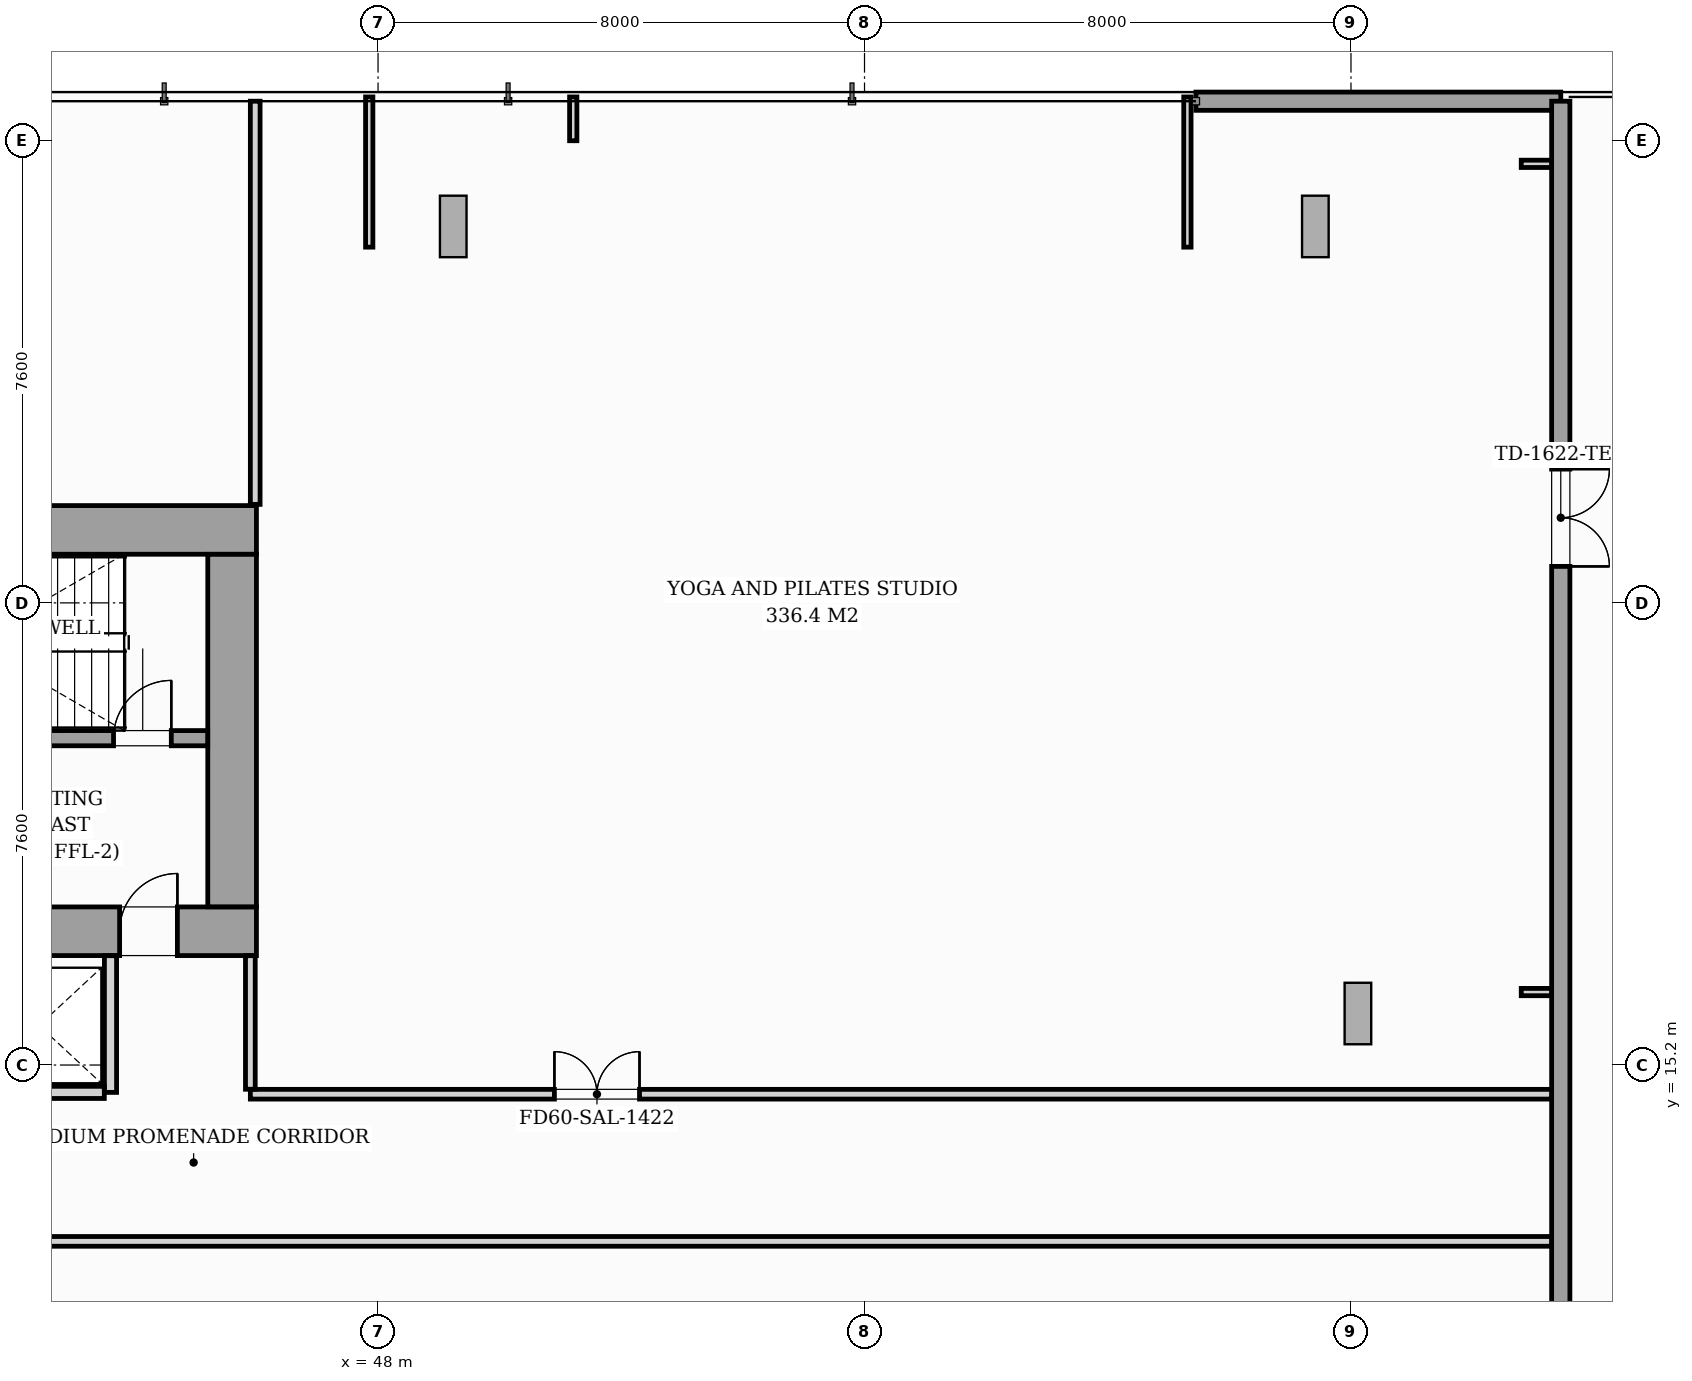
"""IFC4 building model, lengths in metres.
Left out: names, types, materials, properties, quantities, classifications, styles, units other than length and angle.
Written with IfcOpenShell. Run it as: python <this file> out.ifc"""

import sys

from ifc_helpers import new_model, si_unit, direction, frame, frame_2d, origin, origin_2d, place, context, subcontext, project, spatial, rectangle, i_section, extrude, source, transform, mapped, element, fill, save


model = new_model("IFC4")
c1 = context("Model", 3, precision=1e-05, world=origin(), true_north=direction((0.0, 1.0)))
c2 = subcontext(c1, "Body", "Model", "MODEL_VIEW")
j1 = project(units=[si_unit("LENGTHUNIT", "METRE"), si_unit("PLANEANGLEUNIT", "RADIAN")], contexts=[c1])
p1 = place(None, origin())
s1 = spatial("IfcSite", under=j1, at=p1, CompositionType="ELEMENT")
p2 = place(p1, origin())
s2 = spatial("IfcBuilding", under=s1, at=p2, CompositionType="ELEMENT")
p3 = place(p2, frame((0.0, 0.0, 18.5)))
s3 = spatial("IfcBuildingStorey", under=s2, at=p3, CompositionType="ELEMENT", Elevation=18.5)
m1 = source(origin(), c2, "Body", "SweptSolid", [
    extrude(i_section(OverallWidth=0.437, OverallDepth=0.514, WebThickness=0.061, FlangeThickness=0.097, FilletRadius=0.018, at=origin_2d()), origin(), (0.0, 0.0, 1.0), 4.496),
])
for number, where, z_axis, x_axis in (
    (1, (45.6, 17.4, 0.002), (0.0, 0.0, 1.0), (1.0, 0.0, 0.0)),
    (2, (45.6, 24.0, 0.002), (0.0, 0.0, 1.0), (1.0, 0.0, 0.0)),
):
    element("IfcColumn", number, at=place(p3, frame(where, z_axis=z_axis, x_axis=x_axis)), inside=s3, PredefinedType="PILASTER", context=c2, shape_type="MappedRepresentation", body=[
        mapped(m1, transform((0.0, 0.0, 0.0), scale=1.0)),
    ])
m2 = source(origin(), c2, "Body", "SweptSolid", [
    extrude(i_section(OverallWidth=0.438, OverallDepth=1.011, WebThickness=0.041, FlangeThickness=0.074, FilletRadius=0.024, at=origin_2d()), origin(), (0.0, 0.0, 1.0), 7.736),
])
p4 = place(p3, frame((50.874, 29.844, 0.205), z_axis=(-0.780442308848, -0.407074769473, 0.474552351821), x_axis=(0.420755799461, 0.219464101482, 0.880227280525)))
e3 = element("IfcColumn", 3, at=p4, inside=s3, PredefinedType="COLUMN", context=c2, shape_type="MappedRepresentation", body=[
    mapped(m2, transform((0.0, 0.0, 0.0), scale=1.0)),
])
m3 = source(origin(), c2, "Body", "SweptSolid", [
    extrude(i_section(OverallWidth=0.438, OverallDepth=1.011, WebThickness=0.041, FlangeThickness=0.074, FilletRadius=0.024, at=origin_2d()), origin(), (0.0, 0.0, 1.0), 10.322),
])
p5 = place(p3, frame((65.877, 29.834, 0.217), z_axis=(-0.885043945372, -0.303096269503, 0.353312703103), x_axis=(0.334254947044, 0.114470505156, 0.935505282628)))
e4 = element("IfcColumn", 4, at=p5, inside=s3, PredefinedType="COLUMN", context=c2, shape_type="MappedRepresentation", body=[
    mapped(m3, transform((0.0, 0.0, 0.0), scale=1.0)),
])
m4 = source(origin(), c2, "Body", "SweptSolid", [
    extrude(i_section(OverallWidth=0.438, OverallDepth=1.011, WebThickness=0.041, FlangeThickness=0.074, FilletRadius=0.024, at=origin_2d()), origin(), (0.0, 0.0, 1.0), 8.016),
])
p6 = place(p3, frame((66.023, 16.339, 0.207), z_axis=(-0.879002312118, -0.134551736364, 0.457439357218), x_axis=(0.452172509384, 0.069215513355, 0.889240819164)))
e5 = element("IfcColumn", 5, at=p6, inside=s3, PredefinedType="COLUMN", context=c2, shape_type="MappedRepresentation", body=[
    mapped(m4, transform((0.0, 0.0, 0.0), scale=1.0)),
])
p7 = place(p3, frame((61.45, 31.05, 0.0), z_axis=(0.0, 0.0, 1.0), x_axis=(1.0, 0.0, 0.0)))
e6 = element("IfcWall", 6, at=p7, inside=s3, PredefinedType="STANDARD", context=c2, shape_type="SweptSolid", body=[
    extrude(rectangle(XDim=6.0, YDim=0.3, at=frame_2d((3.0, 0.0))), origin(), (0.0, 0.0, 1.0), 4.08),
])
p8 = place(p3, frame((67.45, 31.05, 0.0), z_axis=(0.0, 0.0, 1.0), x_axis=(0.0, -1.0, 0.0)))
e7 = element("IfcWall", 7, at=p8, inside=s3, PredefinedType="STANDARD", context=c2, shape_type="SweptSolid", body=[
    extrude(rectangle(XDim=29.3, YDim=0.3, at=frame_2d((14.65, 0.0))), origin(), (0.0, 0.0, 1.0), 4.08),
])
p9 = place(p8, frame((6.05, 0.0, 0.0)))
e8 = element("IfcOpeningElement", 8, at=p9, cuts=e7, PredefinedType="OPENING", context=c2, shape_type="SweptSolid", body=[
    extrude(rectangle(XDim=1.6, YDim=2.1, at=frame_2d((0.8, 1.05))), frame((0.0, 0.16, 0.0), z_axis=(0.0, -1.0, 0.0), x_axis=(1.0, 0.0, 0.0)), (0.0, 0.0, 1.0), 0.32),
])
p10 = place(p8, frame((23.85, 0.0, 0.9)))
e9 = element("IfcOpeningElement", 9, at=p10, cuts=e7, PredefinedType="OPENING", context=c2, shape_type="SweptSolid", body=[
    extrude(rectangle(XDim=2.0, YDim=2.4, at=frame_2d((1.0, 1.2))), frame((0.0, 0.16, 0.0), z_axis=(0.0, -1.0, 0.0), x_axis=(1.0, 0.0, 0.0)), (0.0, 0.0, 1.0), 0.32),
])
p11 = place(p3, frame((26.0, 17.4, 0.0), z_axis=(0.0, 0.0, 1.0), x_axis=(1.0, 0.0, 0.0)))
e10 = element("IfcWall", 10, at=p11, inside=s3, PredefinedType="SHEAR", context=c2, shape_type="SweptSolid", body=[
    extrude(rectangle(XDim=20.0, YDim=0.8, at=frame_2d((10.0, 0.0))), origin(), (0.0, 0.0, 1.0), 4.5),
])
p12 = place(p11, frame((1.15, 0.0, 0.0)))
e11 = element("IfcOpeningElement", 11, at=p12, cuts=e10, PredefinedType="OPENING", context=c2, shape_type="SweptSolid", body=[
    extrude(rectangle(XDim=0.95, YDim=2.06, at=frame_2d((0.475, 1.03))), frame((0.0, 0.41, 0.0), z_axis=(0.0, -1.0, 0.0), x_axis=(1.0, 0.0, 0.0)), (0.0, 0.0, 1.0), 0.82),
])
p13 = place(p11, frame((9.58, 0.0, 0.0)))
e12 = element("IfcOpeningElement", 12, at=p13, cuts=e10, PredefinedType="OPENING", context=c2, shape_type="SweptSolid", body=[
    extrude(rectangle(XDim=0.9, YDim=2.06, at=frame_2d((0.45, 1.03))), frame((0.0, 0.41, 0.0), z_axis=(0.0, -1.0, 0.0), x_axis=(1.0, 0.0, 0.0)), (0.0, 0.0, 1.0), 0.82),
])
p14 = place(p11, frame((17.75, 0.0, 0.0)))
e13 = element("IfcOpeningElement", 13, at=p14, cuts=e10, PredefinedType="OPENING", context=c2, shape_type="SweptSolid", body=[
    extrude(rectangle(XDim=0.95, YDim=2.06, at=frame_2d((0.475, 1.03))), frame((0.0, 0.41, 0.0), z_axis=(0.0, -1.0, 0.0), x_axis=(1.0, 0.0, 0.0)), (0.0, 0.0, 1.0), 0.82),
])
p15 = place(p3, frame((26.0, 24.0, 0.0), z_axis=(0.0, 0.0, 1.0), x_axis=(1.0, 0.0, 0.0)))
e14 = element("IfcWall", 14, at=p15, inside=s3, PredefinedType="SHEAR", context=c2, shape_type="SweptSolid", body=[
    extrude(rectangle(XDim=20.0, YDim=0.8, at=frame_2d((10.0, 0.0))), origin(), (0.0, 0.0, 1.0), 4.5),
])
p16 = place(p3, frame((45.6, 17.802, 0.0), z_axis=(0.0, 0.0, 1.0), x_axis=(0.0, 1.0, 0.0)))
e15 = element("IfcWall", 15, at=p16, inside=s3, PredefinedType="SHEAR", context=c2, shape_type="SweptSolid", body=[
    extrude(rectangle(XDim=5.796, YDim=0.8, at=frame_2d((2.898, 0.0))), origin(), (0.0, 0.0, 1.0), 4.5),
])
p17 = place(p3, frame((37.05, 20.575, 0.0), z_axis=(0.0, 0.0, 1.0), x_axis=(1.0, 0.0, 0.0)))
e16 = element("IfcWall", 16, at=p17, inside=s3, PredefinedType="SOLIDWALL", context=c2, shape_type="SweptSolid", body=[
    extrude(rectangle(XDim=8.148, YDim=0.25, at=frame_2d((4.074, 0.0))), origin(), (0.0, 0.0, 1.0), 4.5),
])
p18 = place(p17, frame((6.6, 0.0, 0.0)))
e17 = element("IfcOpeningElement", 17, at=p18, cuts=e16, PredefinedType="OPENING", context=c2, shape_type="SweptSolid", body=[
    extrude(rectangle(XDim=0.95, YDim=2.06, at=frame_2d((0.475, 1.03))), frame((0.0, 0.135, 0.0), z_axis=(0.0, -1.0, 0.0), x_axis=(1.0, 0.0, 0.0)), (0.0, 0.0, 1.0), 0.27),
])
p19 = place(p3, frame((43.6, 14.75, 0.0), z_axis=(0.0, 0.0, 1.0), x_axis=(0.0, 1.0, 0.0)))
e18 = element("IfcWall", 18, at=p19, inside=s3, PredefinedType="PARTITIONING", context=c2, shape_type="SweptSolid", body=[
    extrude(rectangle(XDim=2.248, YDim=0.2, at=frame_2d((1.124, 0.0))), origin(), (0.0, 0.0, 1.0), 4.08),
])
p20 = place(p3, frame((41.352, 14.75, 0.0), z_axis=(0.0, 0.0, 1.0), x_axis=(1.0, 0.0, 0.0)))
e19 = element("IfcWall", 19, at=p20, inside=s3, PredefinedType="PARTITIONING", context=c2, shape_type="SweptSolid", body=[
    extrude(rectangle(XDim=2.146, YDim=0.2, at=frame_2d((1.073, 0.0))), origin(), (0.0, 0.0, 1.0), 4.08),
])
p21 = place(p3, frame((4.55, 12.3, 0.0), z_axis=(0.0, 0.0, 1.0), x_axis=(1.0, 0.0, 0.0)))
e20 = element("IfcWall", 20, at=p21, inside=s3, PredefinedType="PARTITIONING", context=c2, shape_type="SweptSolid", body=[
    extrude(rectangle(XDim=62.748, YDim=0.16, at=frame_2d((31.374, 0.0))), origin(), (0.0, 0.0, 1.0), 4.08),
])
p22 = place(p21, frame((6.5, 0.0, 0.0)))
e21 = element("IfcOpeningElement", 21, at=p22, cuts=e20, PredefinedType="OPENING", context=c2, shape_type="SweptSolid", body=[
    extrude(rectangle(XDim=1.4, YDim=2.08, at=frame_2d((0.7, 1.04))), frame((0.0, 0.09, 0.0), z_axis=(0.0, -1.0, 0.0), x_axis=(1.0, 0.0, 0.0)), (0.0, 0.0, 1.0), 0.18),
])
p23 = place(p21, frame((28.0, 0.0, 0.0)))
e22 = element("IfcOpeningElement", 22, at=p23, cuts=e20, PredefinedType="OPENING", context=c2, shape_type="SweptSolid", body=[
    extrude(rectangle(XDim=1.4, YDim=2.08, at=frame_2d((0.7, 1.04))), frame((0.0, 0.09, 0.0), z_axis=(0.0, -1.0, 0.0), x_axis=(1.0, 0.0, 0.0)), (0.0, 0.0, 1.0), 0.18),
])
p24 = place(p3, frame((45.9, 14.72, 0.0), z_axis=(0.0, 0.0, 1.0), x_axis=(1.0, 0.0, 0.0)))
e23 = element("IfcWall", 23, at=p24, inside=s3, PredefinedType="PARTITIONING", context=c2, shape_type="SweptSolid", body=[
    extrude(rectangle(XDim=21.398, YDim=0.16, at=frame_2d((10.699, 0.0))), origin(), (0.0, 0.0, 1.0), 4.08),
])
p25 = place(p24, frame((5.0, 0.0, 0.0)))
e24 = element("IfcOpeningElement", 24, at=p25, cuts=e23, PredefinedType="OPENING", context=c2, shape_type="SweptSolid", body=[
    extrude(rectangle(XDim=1.4, YDim=2.08, at=frame_2d((0.7, 1.04))), frame((0.0, 0.09, 0.0), z_axis=(0.0, -1.0, 0.0), x_axis=(1.0, 0.0, 0.0)), (0.0, 0.0, 1.0), 0.18),
])
p26 = place(p3, frame((45.98, 24.42, 0.0), z_axis=(0.0, 0.0, 1.0), x_axis=(0.0, 1.0, 0.0)))
e25 = element("IfcWall", 25, at=p26, inside=s3, PredefinedType="PARTITIONING", context=c2, shape_type="SweptSolid", body=[
    extrude(rectangle(XDim=6.63, YDim=0.16, at=frame_2d((3.315, 0.0))), origin(), (0.0, 0.0, 1.0), 4.08),
])
p27 = place(p3, frame((45.9, 14.802, 0.0), z_axis=(0.0, 0.0, 1.0), x_axis=(0.0, 1.0, 0.0)))
e26 = element("IfcWall", 26, at=p27, inside=s3, PredefinedType="PARTITIONING", context=c2, shape_type="SweptSolid", body=[
    extrude(rectangle(XDim=2.196, YDim=0.16, at=frame_2d((1.098, 0.0))), origin(), (0.0, 0.0, 1.0), 4.08),
])
for number, where, z_axis, x_axis in (
    (27, (47.855, 28.65, 0.0), (0.0, 0.0, 1.0), (0.0, 1.0, 0.0)),
    (28, (61.31, 28.65, 0.0), (0.0, 0.0, 1.0), (0.0, 1.0, 0.0)),
):
    element("IfcWall", number, at=place(p3, frame(where, z_axis=z_axis, x_axis=x_axis)), inside=s3, PredefinedType="PARTITIONING", context=c2, shape_type="SweptSolid", body=[
        extrude(rectangle(XDim=2.47, YDim=0.12, at=frame_2d((1.235, 0.0))), origin(), (0.0, 0.0, 1.0), 4.08),
    ])
p28 = place(p3, frame((51.21, 30.4, 0.0), z_axis=(0.0, 0.0, 1.0), x_axis=(0.0, 1.0, 0.0)))
e29 = element("IfcWall", 29, at=p28, inside=s3, PredefinedType="PARTITIONING", context=c2, shape_type="SweptSolid", body=[
    extrude(rectangle(XDim=0.72, YDim=0.12, at=frame_2d((0.36, 0.0))), origin(), (0.0, 0.0, 1.0), 4.08),
])
for number, where, z_axis, x_axis in (
    (30, (66.8, 30.02, 0.0), (0.0, 0.0, 1.0), (1.0, 0.0, 0.0)),
    (31, (66.8, 16.4, 0.0), (0.0, 0.0, 1.0), (1.0, 0.0, 0.0)),
):
    element("IfcWall", number, at=place(p3, frame(where, z_axis=z_axis, x_axis=x_axis)), inside=s3, PredefinedType="PARTITIONING", context=c2, shape_type="SweptSolid", body=[
        extrude(rectangle(XDim=0.498, YDim=0.12, at=frame_2d((0.249, 0.0))), origin(), (0.0, 0.0, 1.0), 4.08),
    ])
m5 = source(origin(), c2, "Body", "SweptSolid", [
    extrude(rectangle(XDim=1.6, YDim=2.1, at=frame_2d((0.8, 1.05))), frame((0.0, 0.025, 0.0), z_axis=(0.0, -1.0, 0.0), x_axis=(1.0, 0.0, 0.0)), (0.0, 0.0, 1.0), 0.05),
])
p29 = place(p9, origin())
e32 = element("IfcDoor", 32, at=p29, inside=s3, OperationType="DOUBLE_DOOR_SINGLE_SWING", PredefinedType="DOOR", context=c2, shape_type="MappedRepresentation", body=[
    mapped(m5, transform((0.0, 0.0, 0.0), scale=1.0)),
])
fill(e8, e32)
m6 = source(origin(), c2, "Body", "SweptSolid", [
    extrude(rectangle(XDim=0.95, YDim=2.06, at=frame_2d((0.475, 1.03))), frame((0.0, 0.025, 0.0), z_axis=(0.0, -1.0, 0.0), x_axis=(1.0, 0.0, 0.0)), (0.0, 0.0, 1.0), 0.05),
])
p30 = place(p14, origin())
e33 = element("IfcDoor", 33, at=p30, inside=s3, OperationType="SINGLE_SWING_RIGHT", PredefinedType="DOOR", context=c2, shape_type="MappedRepresentation", body=[
    mapped(m6, transform((0.0, 0.0, 0.0), scale=1.0)),
])
fill(e13, e33)
p31 = place(p18, origin())
e34 = element("IfcDoor", 34, at=p31, inside=s3, OperationType="SINGLE_SWING_RIGHT", PredefinedType="DOOR", context=c2, shape_type="MappedRepresentation", body=[
    mapped(m6, transform((0.0, 0.0, 0.0), scale=1.0)),
])
fill(e17, e34)
m7 = source(origin(), c2, "Body", "SweptSolid", [
    extrude(rectangle(XDim=1.4, YDim=2.08, at=frame_2d((0.7, 1.04))), frame((0.0, 0.025, 0.0), z_axis=(0.0, -1.0, 0.0), x_axis=(1.0, 0.0, 0.0)), (0.0, 0.0, 1.0), 0.05),
])
p32 = place(p25, origin())
e35 = element("IfcDoor", 35, at=p32, inside=s3, OperationType="DOUBLE_DOOR_SINGLE_SWING", PredefinedType="DOOR", context=c2, shape_type="MappedRepresentation", body=[
    mapped(m7, transform((0.0, 0.0, 0.0), scale=1.0)),
])
fill(e24, e35)
save(model, sys.argv[1])
